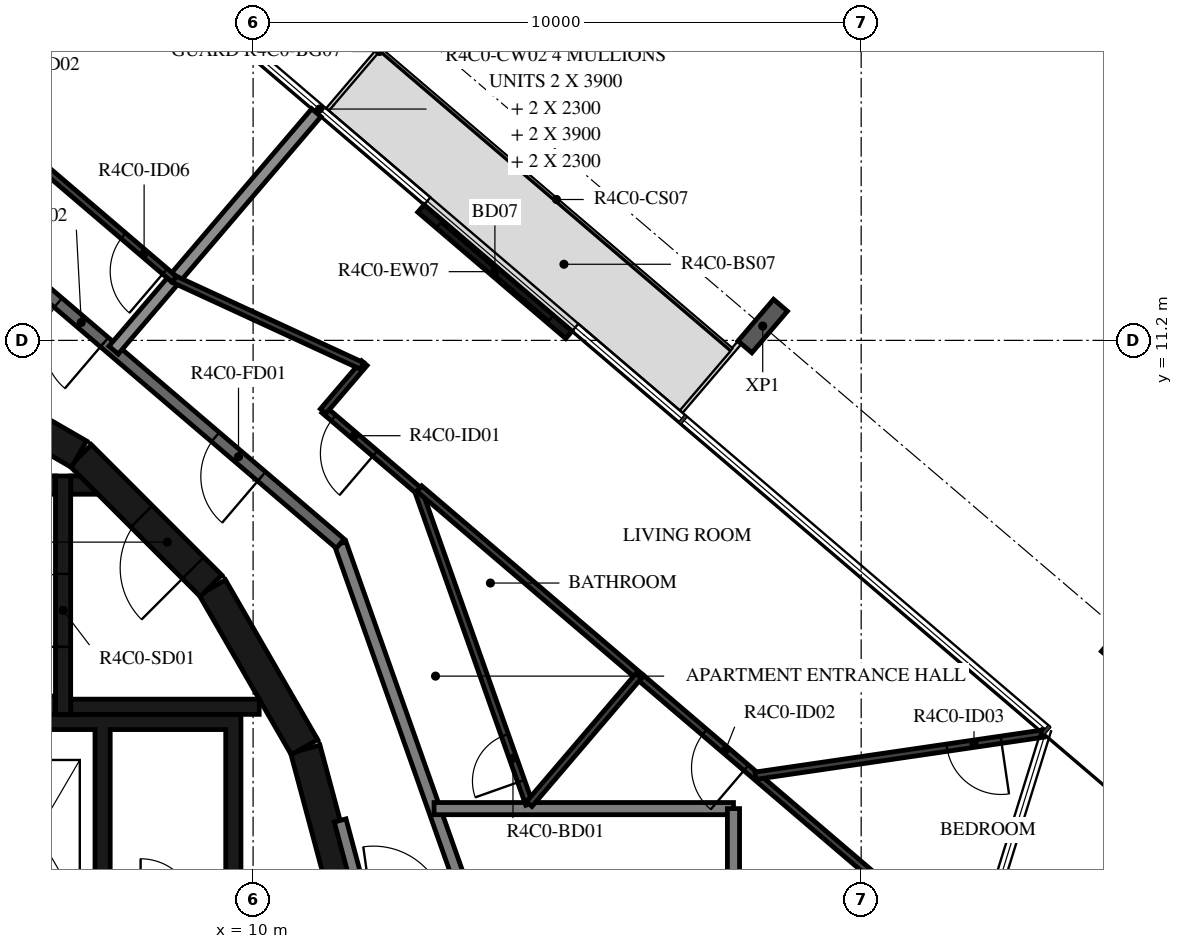
"""IFC4 building model, lengths in metres.
Left out: names, types, materials, properties, quantities, classifications, styles, units other than length and angle.
Written with IfcOpenShell. Run it as: python <this file> out.ifc"""

import sys

from ifc_helpers import new_model, si_unit, direction, frame, frame_2d, origin, origin_2d, place, context, subcontext, project, spatial, polyline, rectangle, i_section, outline, extrude, element, fill, save


model = new_model("IFC4")
c1 = context("Model", 3, precision=1e-05, world=origin(), true_north=direction((0.0, 1.0)))
c2 = subcontext(c1, "Body", "Model", "MODEL_VIEW")
j1 = project(units=[si_unit("LENGTHUNIT", "METRE"), si_unit("PLANEANGLEUNIT", "RADIAN")], contexts=[c1])
p1 = place(None, origin())
s1 = spatial("IfcSite", under=j1, at=p1, CompositionType="ELEMENT")
p2 = place(p1, origin())
s2 = spatial("IfcBuilding", under=s1, at=p2, CompositionType="ELEMENT")
p3 = place(p2, frame((0.0, 0.0, 172.7)))
s3 = spatial("IfcBuildingStorey", under=s2, at=p3, CompositionType="ELEMENT", Elevation=172.7)
for number, where, z_axis, x_axis in (
    (1, (24.358, 6.331, -0.38), (0.0, 0.0, 1.0), (0.76, -0.649, 0.0)),
    (2, (18.381, 11.436, -0.38), (0.0, 0.0, 1.0), (0.76, -0.649, 0.0)),
):
    element("IfcColumn", number, at=place(p3, frame(where, z_axis=z_axis, x_axis=x_axis)), inside=s3, PredefinedType="COLUMN", context=c2, shape_type="SweptSolid", body=[
        extrude(i_section(OverallWidth=0.3, OverallDepth=0.9, WebThickness=0.019, FlangeThickness=0.035, FilletRadius=0.03, at=origin_2d()), origin(), (0.0, 0.0, 1.0), 3.5),
    ])
p4 = place(p3, frame((15.193, 11.291, 0.0), z_axis=(0.0, 0.0, 1.0), x_axis=(-0.760391731187, 0.649464714317, 0.0)))
e3 = element("IfcWall", 3, at=p4, inside=s3, PredefinedType="STANDARD", context=c2, shape_type="SweptSolid", body=[
    extrude(rectangle(XDim=3.2, YDim=0.16, at=frame_2d((1.6, 0.0))), origin(), (0.0, 0.0, 1.0), 3.12),
])
p5 = place(p4, frame((0.4, 0.0, 0.0)))
e4 = element("IfcOpeningElement", 4, at=p5, cuts=e3, PredefinedType="OPENING", context=c2, shape_type="SweptSolid", body=[
    extrude(rectangle(XDim=2.4, YDim=2.4, at=frame_2d((1.2, 1.2))), frame((0.0, 0.09, 0.0), z_axis=(0.0, -1.0, 0.0), x_axis=(1.0, 0.0, 0.0)), (0.0, 0.0, 1.0), 0.18),
])
for number, where, z_axis, x_axis in (
    (5, (11.643, 1.55, 0.0), (0.0, 0.0, 1.0), (-0.259, 0.966, 0.0)),
    (6, (10.845, 4.51, 0.0), (0.0, 0.0, 1.0), (-0.5, 0.866, 0.0)),
):
    element("IfcWall", number, at=place(p3, frame(where, z_axis=z_axis, x_axis=x_axis)), inside=s3, PredefinedType="SHEAR", context=c2, shape_type="SweptSolid", body=[
        extrude(rectangle(XDim=3.033, YDim=0.5, at=frame_2d((1.516, 0.0))), origin(), (0.0, 0.0, 1.0), 3.12),
    ])
p6 = place(p3, frame((9.308, 7.164, 0.0), z_axis=(0.0, 0.0, 1.0), x_axis=(-0.707106781187, 0.707106781187, 0.0)))
e7 = element("IfcWall", 7, at=p6, inside=s3, PredefinedType="SHEAR", context=c2, shape_type="SweptSolid", body=[
    extrude(rectangle(XDim=3.032, YDim=0.5, at=frame_2d((1.516, 0.0))), origin(), (0.0, 0.0, 1.0), 3.12),
])
p7 = place(p6, frame((0.416, 0.0, 0.0)))
e8 = element("IfcOpeningElement", 8, at=p7, cuts=e7, PredefinedType="OPENING", context=c2, shape_type="SweptSolid", body=[
    extrude(rectangle(XDim=1.2, YDim=2.1, at=frame_2d((0.6, 1.05))), frame((0.0, 0.26, 0.0), z_axis=(0.0, -1.0, 0.0), x_axis=(1.0, 0.0, 0.0)), (0.0, 0.0, 1.0), 0.52),
])
p8 = place(p3, frame((7.137, 9.329, 0.0), z_axis=(0.0, 0.0, 1.0), x_axis=(-0.865975092491, 0.500087131594, 0.0)))
e9 = element("IfcWall", 9, at=p8, inside=s3, PredefinedType="SHEAR", context=c2, shape_type="SweptSolid", body=[
    extrude(rectangle(XDim=3.033, YDim=0.5, at=frame_2d((1.516, 0.0))), origin(), (0.0, 0.0, 1.0), 3.12),
])
p9 = place(p8, frame((1.066, 0.0, 0.0)))
e10 = element("IfcOpeningElement", 10, at=p9, cuts=e9, PredefinedType="OPENING", context=c2, shape_type="SweptSolid", body=[
    extrude(rectangle(XDim=0.9, YDim=2.1, at=frame_2d((0.45, 1.05))), frame((0.0, 0.26, 0.0), z_axis=(0.0, -1.0, 0.0), x_axis=(1.0, 0.0, 0.0)), (0.0, 0.0, 1.0), 0.52),
])
for number, where, z_axis, x_axis in (
    (11, (0.0, 5.2, 0.0), (0.0, 0.0, 1.0), (1.0, 0.0, 0.0)),
    (12, (0.0, 8.82, 0.0), (0.0, 0.0, 1.0), (1.0, 0.0, 0.0)),
):
    element("IfcWall", number, at=place(p3, frame(where, z_axis=z_axis, x_axis=x_axis)), inside=s3, PredefinedType="SHEAR", context=c2, shape_type="SweptSolid", body=[
        extrude(rectangle(XDim=6.75, YDim=0.3, at=frame_2d((3.375, 0.0))), origin(), (0.0, 0.0, 1.0), 3.12),
    ])
p10 = place(p3, frame((6.875, 5.05, 0.0), z_axis=(0.0, 0.0, 1.0), x_axis=(0.0, 1.0, 0.0)))
e13 = element("IfcWall", 13, at=p10, inside=s3, PredefinedType="SHEAR", context=c2, shape_type="SweptSolid", body=[
    extrude(rectangle(XDim=3.92, YDim=0.25, at=frame_2d((1.96, 0.0))), origin(), (0.0, 0.0, 1.0), 3.12),
])
p11 = place(p10, frame((1.11, 0.0, 0.0)))
e14 = element("IfcOpeningElement", 14, at=p11, cuts=e13, PredefinedType="OPENING", context=c2, shape_type="SweptSolid", body=[
    extrude(rectangle(XDim=1.2, YDim=2.1, at=frame_2d((0.6, 1.05))), frame((0.0, 0.135, 0.0), z_axis=(0.0, -1.0, 0.0), x_axis=(1.0, 0.0, 0.0)), (0.0, 0.0, 1.0), 0.27),
])
p12 = place(p3, frame((7.0, 5.175, 0.0), z_axis=(0.0, 0.0, 1.0), x_axis=(1.0, 0.0, 0.0)))
e15 = element("IfcWall", 15, at=p12, inside=s3, PredefinedType="SHEAR", context=c2, shape_type="SweptSolid", body=[
    extrude(rectangle(XDim=3.1, YDim=0.25, at=frame_2d((1.55, 0.0))), origin(), (0.0, 0.0, 1.0), 3.12),
])
p13 = place(p3, origin())
e16 = element("IfcWall", 16, at=p13, inside=s3, PredefinedType="SHEAR", context=c2, shape_type="SweptSolid", body=[
    extrude(outline(polyline([(7.448, 8.67), (7.0, 8.67), (7.0, 8.97), (7.148, 8.97), (7.448, 8.67)])), origin(), (0.0, 0.0, 1.0), 3.12),
])
p14 = place(p3, origin())
e17 = element("IfcWall", 17, at=p14, inside=s3, PredefinedType="SHEAR", context=c2, shape_type="SweptSolid", body=[
    extrude(outline(polyline([(-9.55, 4.8), (-1.2, 4.8), (-1.2, 1.9), (-0.95, 1.9), (-0.95, 4.8), (0.95, 4.8), (0.95, 1.9), (1.2, 1.9), (1.2, 4.8), (3.1, 4.8), (3.1, 1.9), (3.35, 1.9), (3.35, 4.8), (5.25, 4.8), (5.25, 1.9), (5.5, 1.9), (5.5, 4.8), (7.4, 4.8), (7.4, 1.9), (7.65, 1.9), (7.65, 4.8), (9.55, 4.8), (9.55, 1.9), (9.8, 1.9), (9.8, 4.8), (9.8, 5.05), (-9.8, 5.05), (-9.8, 4.8), (-9.8, 1.9), (-9.55, 1.9), (-9.55, 4.8)])), origin(), (0.0, 0.0, 1.0), 3.12),
])
p15 = place(p3, frame((11.87, 1.668, 0.0), z_axis=(0.0, 0.0, 1.0), x_axis=(-0.258836880648, 0.965921047093, 0.0)))
e18 = element("IfcWall", 18, at=p15, inside=s3, PredefinedType="STANDARD", context=c2, shape_type="SweptSolid", body=[
    extrude(rectangle(XDim=1.695, YDim=0.2, at=frame_2d((0.848, 0.0))), origin(), (0.0, 0.0, 1.0), 3.12),
])
p16 = place(p3, frame((13.542, 1.903, 0.0), z_axis=(0.0, 0.0, 1.0), x_axis=(-0.333808508206, 0.942640907159, 0.0)))
e19 = element("IfcWall", 19, at=p16, inside=s3, PredefinedType="STANDARD", context=c2, shape_type="SweptSolid", body=[
    extrude(rectangle(XDim=6.317, YDim=0.2, at=frame_2d((3.158, 0.0))), origin(), (0.0, 0.0, 1.0), 3.12),
])
p17 = place(p3, frame((11.433, 7.858, 0.0), z_axis=(0.0, 0.0, 1.0), x_axis=(-0.760412154545, 0.649440801937, 0.0)))
e20 = element("IfcWall", 20, at=p17, inside=s3, PredefinedType="STANDARD", context=c2, shape_type="SweptSolid", body=[
    extrude(rectangle(XDim=7.181, YDim=0.2, at=frame_2d((3.59, 0.0))), origin(), (0.0, 0.0, 1.0), 3.12),
])
p18 = place(p17, frame((1.7, 0.0, 0.0)))
e21 = element("IfcOpeningElement", 21, at=p18, cuts=e20, PredefinedType="OPENING", context=c2, shape_type="SweptSolid", body=[
    extrude(rectangle(XDim=1.0, YDim=2.1, at=frame_2d((0.5, 1.05))), frame((0.0, 0.11, 0.0), z_axis=(0.0, -1.0, 0.0), x_axis=(1.0, 0.0, 0.0)), (0.0, 0.0, 1.0), 0.22),
])
p19 = place(p17, frame((5.101, 0.0, 0.0)))
e22 = element("IfcOpeningElement", 22, at=p19, cuts=e20, PredefinedType="OPENING", context=c2, shape_type="SweptSolid", body=[
    extrude(rectangle(XDim=1.0, YDim=2.1, at=frame_2d((0.5, 1.05))), frame((0.0, 0.11, 0.0), z_axis=(0.0, -1.0, 0.0), x_axis=(1.0, 0.0, 0.0)), (0.0, 0.0, 1.0), 0.22),
])
p20 = place(p3, frame((17.9, 3.5, 0.0), z_axis=(0.0, 0.0, 1.0), x_axis=(-1.0, 0.0, 0.0)))
e23 = element("IfcWall", 23, at=p20, inside=s3, PredefinedType="STANDARD", context=c2, shape_type="SweptSolid", body=[
    extrude(rectangle(XDim=4.924, YDim=0.2, at=frame_2d((2.462, 0.0))), origin(), (0.0, 0.0, 1.0), 3.12),
])
p21 = place(p3, frame((17.9, -3.318, 0.0), z_axis=(0.0, 0.0, 1.0), x_axis=(0.0, 1.0, 0.0)))
e24 = element("IfcWall", 24, at=p21, inside=s3, PredefinedType="STANDARD", context=c2, shape_type="SweptSolid", body=[
    extrude(rectangle(XDim=6.818, YDim=0.2, at=frame_2d((3.409, 0.0))), origin(), (0.0, 0.0, 1.0), 3.12),
])
p22 = place(p3, frame((11.04, 14.943, 0.0), z_axis=(0.0, 0.0, 1.0), x_axis=(-0.649442880087, -0.760410379666, 0.0)))
e25 = element("IfcWall", 25, at=p22, inside=s3, PredefinedType="STANDARD", context=c2, shape_type="SweptSolid", body=[
    extrude(rectangle(XDim=5.133, YDim=0.2, at=frame_2d((2.566, 0.0))), origin(), (0.0, 0.0, 1.0), 2.73),
])
p23 = place(p3, frame((14.541, 3.575, 0.0), z_axis=(0.0, 0.0, 1.0), x_axis=(-0.333799280318, 0.942644174893, 0.0)))
e26 = element("IfcWall", 26, at=p23, inside=s3, PredefinedType="PARTITIONING", context=c2, shape_type="SweptSolid", body=[
    extrude(rectangle(XDim=5.477, YDim=0.12, at=frame_2d((2.738, 0.0))), origin(), (0.0, 0.0, 1.0), 3.12),
])
p24 = place(p23, frame((0.4, 0.0, 0.0)))
e27 = element("IfcOpeningElement", 27, at=p24, cuts=e26, PredefinedType="OPENING", context=c2, shape_type="SweptSolid", body=[
    extrude(rectangle(XDim=0.8, YDim=2.1, at=frame_2d((0.4, 1.05))), frame((0.0, 0.07, 0.0), z_axis=(0.0, -1.0, 0.0), x_axis=(1.0, 0.0, 0.0)), (0.0, 0.0, 1.0), 0.14),
])
p25 = place(p3, frame((12.713, 8.737, 0.0), z_axis=(0.0, 0.0, 1.0), x_axis=(-0.760410825807, 0.649442357716, 0.0)))
e28 = element("IfcWall", 28, at=p25, inside=s3, PredefinedType="PARTITIONING", context=c2, shape_type="SweptSolid", body=[
    extrude(rectangle(XDim=2.029, YDim=0.12, at=frame_2d((1.014, 0.0))), origin(), (0.0, 0.0, 1.0), 3.12),
])
p26 = place(p25, frame((0.929, 0.0, 0.0)))
e29 = element("IfcOpeningElement", 29, at=p26, cuts=e28, PredefinedType="OPENING", context=c2, shape_type="SweptSolid", body=[
    extrude(rectangle(XDim=0.9, YDim=2.1, at=frame_2d((0.45, 1.05))), frame((0.0, 0.07, 0.0), z_axis=(0.0, -1.0, 0.0), x_axis=(1.0, 0.0, 0.0)), (0.0, 0.0, 1.0), 0.14),
])
p27 = place(p3, frame((12.734, 8.762, 0.0), z_axis=(0.0, 0.0, 1.0), x_axis=(0.760390484255, -0.649466174219, 0.0)))
e30 = element("IfcWall", 30, at=p27, inside=s3, PredefinedType="PARTITIONING", context=c2, shape_type="SweptSolid", body=[
    extrude(rectangle(XDim=4.783, YDim=0.12, at=frame_2d((2.391, 0.0))), origin(), (0.0, 0.0, 1.0), 3.12),
])
p28 = place(p3, frame((11.153, 10.034, 0.0), z_axis=(0.0, 0.0, 1.0), x_axis=(0.649381401329, 0.760462882466, 0.0)))
e31 = element("IfcWall", 31, at=p28, inside=s3, PredefinedType="PARTITIONING", context=c2, shape_type="SweptSolid", body=[
    extrude(rectangle(XDim=1.042, YDim=0.12, at=frame_2d((0.521, 0.0))), origin(), (0.0, 0.0, 1.0), 3.12),
])
p29 = place(p3, frame((11.79, 10.781, 0.0), z_axis=(0.0, 0.0, 1.0), x_axis=(-0.907999296286, 0.418971691101, 0.0)))
e32 = element("IfcWall", 32, at=p29, inside=s3, PredefinedType="PARTITIONING", context=c2, shape_type="SweptSolid", body=[
    extrude(rectangle(XDim=3.401, YDim=0.12, at=frame_2d((1.701, 0.0))), origin(), (0.0, 0.0, 1.0), 3.12),
])
p30 = place(p3, frame((23.411, -0.357, 0.0), z_axis=(0.0, 0.0, 1.0), x_axis=(-0.76041871148, 0.649433124525, 0.0)))
e33 = element("IfcWall", 33, at=p30, inside=s3, PredefinedType="PARTITIONING", context=c2, shape_type="SweptSolid", body=[
    extrude(rectangle(XDim=9.259, YDim=0.12, at=frame_2d((4.629, 0.0))), origin(), (0.0, 0.0, 1.0), 3.12),
])
p31 = place(p30, frame((6.972, 0.0, 0.0)))
e34 = element("IfcOpeningElement", 34, at=p31, cuts=e33, PredefinedType="OPENING", context=c2, shape_type="SweptSolid", body=[
    extrude(rectangle(XDim=0.9, YDim=2.1, at=frame_2d((0.45, 1.05))), frame((0.0, 0.07, 0.0), z_axis=(0.0, -1.0, 0.0), x_axis=(1.0, 0.0, 0.0)), (0.0, 0.0, 1.0), 0.14),
])
p32 = place(p30, frame((0.2, 0.0, 0.0)))
e35 = element("IfcOpeningElement", 35, at=p32, cuts=e33, PredefinedType="OPENING", context=c2, shape_type="SweptSolid", body=[
    extrude(rectangle(XDim=0.9, YDim=2.1, at=frame_2d((0.45, 1.05))), frame((0.0, 0.07, 0.0), z_axis=(0.0, -1.0, 0.0), x_axis=(1.0, 0.0, 0.0)), (0.0, 0.0, 1.0), 0.14),
])
p33 = place(p3, frame((16.341, 5.682, 0.0), z_axis=(0.0, 0.0, 1.0), x_axis=(-0.64946993237, -0.76038727432, 0.0)))
e36 = element("IfcWall", 36, at=p33, inside=s3, PredefinedType="PARTITIONING", context=c2, shape_type="SweptSolid", body=[
    extrude(rectangle(XDim=2.771, YDim=0.12, at=frame_2d((1.386, 0.0))), origin(), (0.0, 0.0, 1.0), 3.12),
])
p34 = place(p3, frame((22.994, 4.734, 0.0), z_axis=(0.0, 0.0, 1.0), x_axis=(-0.989449286977, -0.144879634529, 0.0)))
e37 = element("IfcWall", 37, at=p34, inside=s3, PredefinedType="PARTITIONING", context=c2, shape_type="SweptSolid", body=[
    extrude(rectangle(XDim=4.782, YDim=0.12, at=frame_2d((2.391, 0.0))), origin(), (0.0, 0.0, 1.0), 3.12),
])
p35 = place(p34, frame((0.7, 0.0, 0.0)))
e38 = element("IfcOpeningElement", 38, at=p35, cuts=e37, PredefinedType="OPENING", context=c2, shape_type="SweptSolid", body=[
    extrude(rectangle(XDim=0.9, YDim=2.1, at=frame_2d((0.45, 1.05))), frame((0.0, 0.07, 0.0), z_axis=(0.0, -1.0, 0.0), x_axis=(1.0, 0.0, 0.0)), (0.0, 0.0, 1.0), 0.14),
])
p36 = place(p3, frame((8.702, 12.206, 0.0), z_axis=(0.0, 0.0, 1.0), x_axis=(-0.760401313718, 0.649453494945, 0.0)))
e39 = element("IfcWall", 39, at=p36, inside=s3, PredefinedType="PARTITIONING", context=c2, shape_type="SweptSolid", body=[
    extrude(rectangle(XDim=16.724, YDim=0.12, at=frame_2d((8.362, 0.0))), origin(), (0.0, 0.0, 1.0), 3.12),
])
p37 = place(p36, frame((0.2, 0.0, 0.0)))
e40 = element("IfcOpeningElement", 40, at=p37, cuts=e39, PredefinedType="OPENING", context=c2, shape_type="SweptSolid", body=[
    extrude(rectangle(XDim=0.9, YDim=2.1, at=frame_2d((0.45, 1.05))), frame((0.0, 0.07, 0.0), z_axis=(0.0, -1.0, 0.0), x_axis=(1.0, 0.0, 0.0)), (0.0, 0.0, 1.0), 0.14),
])
p38 = place(p36, frame((8.02, 0.0, 0.0)))
e41 = element("IfcOpeningElement", 41, at=p38, cuts=e39, PredefinedType="OPENING", context=c2, shape_type="SweptSolid", body=[
    extrude(rectangle(XDim=0.9, YDim=2.1, at=frame_2d((0.45, 1.05))), frame((0.0, 0.07, 0.0), z_axis=(0.0, -1.0, 0.0), x_axis=(1.0, 0.0, 0.0)), (0.0, 0.0, 1.0), 0.14),
])
p39 = place(p36, frame((14.412, 0.0, 0.0)))
e42 = element("IfcOpeningElement", 42, at=p39, cuts=e39, PredefinedType="OPENING", context=c2, shape_type="SweptSolid", body=[
    extrude(rectangle(XDim=0.9, YDim=2.1, at=frame_2d((0.45, 1.05))), frame((0.0, 0.07, 0.0), z_axis=(0.0, -1.0, 0.0), x_axis=(1.0, 0.0, 0.0)), (0.0, 0.0, 1.0), 0.14),
])
p40 = place(p5, origin())
e43 = element("IfcDoor", 43, at=p40, inside=s3, OperationType="DOUBLE_DOOR_SLIDING", PredefinedType="DOOR", context=c2, shape_type="SweptSolid", body=[
    extrude(rectangle(XDim=2.4, YDim=2.4, at=frame_2d((1.2, 1.2))), frame((0.0, 0.025, 0.0), z_axis=(0.0, -1.0, 0.0), x_axis=(1.0, 0.0, 0.0)), (0.0, 0.0, 1.0), 0.05),
])
fill(e4, e43)
p41 = place(p11, origin())
e44 = element("IfcDoor", 44, at=p41, inside=s3, OperationType="SINGLE_SWING_LEFT", PredefinedType="DOOR", context=c2, shape_type="SweptSolid", body=[
    extrude(rectangle(XDim=1.2, YDim=2.1, at=frame_2d((0.6, 1.05))), frame((0.0, 0.025, 0.0), z_axis=(0.0, -1.0, 0.0), x_axis=(1.0, 0.0, 0.0)), (0.0, 0.0, 1.0), 0.05),
])
fill(e14, e44)
p42 = place(p7, origin())
e45 = element("IfcDoor", 45, at=p42, inside=s3, OperationType="SINGLE_SWING_RIGHT", PredefinedType="DOOR", context=c2, shape_type="SweptSolid", body=[
    extrude(rectangle(XDim=1.2, YDim=2.1, at=frame_2d((0.6, 1.05))), frame((0.0, 0.025, 0.0), z_axis=(0.0, -1.0, 0.0), x_axis=(1.0, 0.0, 0.0)), (0.0, 0.0, 1.0), 0.05),
])
fill(e8, e45)
p43 = place(p18, origin())
e46 = element("IfcDoor", 46, at=p43, inside=s3, OperationType="SINGLE_SWING_LEFT", PredefinedType="DOOR", context=c2, shape_type="SweptSolid", body=[
    extrude(rectangle(XDim=1.0, YDim=2.1, at=frame_2d((0.5, 1.05))), frame((0.0, 0.025, 0.0), z_axis=(0.0, -1.0, 0.0), x_axis=(1.0, 0.0, 0.0)), (0.0, 0.0, 1.0), 0.05),
])
fill(e21, e46)
p44 = place(p24, origin())
e47 = element("IfcDoor", 47, at=p44, inside=s3, OperationType="SINGLE_SWING_LEFT", PredefinedType="DOOR", context=c2, shape_type="SweptSolid", body=[
    extrude(rectangle(XDim=0.8, YDim=2.1, at=frame_2d((0.4, 1.05))), frame((0.0, 0.025, 0.0), z_axis=(0.0, -1.0, 0.0), x_axis=(1.0, 0.0, 0.0)), (0.0, 0.0, 1.0), 0.05),
])
fill(e27, e47)
p45 = place(p26, origin())
e48 = element("IfcDoor", 48, at=p45, inside=s3, OperationType="SINGLE_SWING_LEFT", PredefinedType="DOOR", context=c2, shape_type="SweptSolid", body=[
    extrude(rectangle(XDim=0.9, YDim=2.1, at=frame_2d((0.45, 1.05))), frame((0.0, 0.025, 0.0), z_axis=(0.0, -1.0, 0.0), x_axis=(1.0, 0.0, 0.0)), (0.0, 0.0, 1.0), 0.05),
])
fill(e29, e48)
p46 = place(p31, origin())
e49 = element("IfcDoor", 49, at=p46, inside=s3, OperationType="SINGLE_SWING_RIGHT", PredefinedType="DOOR", context=c2, shape_type="SweptSolid", body=[
    extrude(rectangle(XDim=0.9, YDim=2.1, at=frame_2d((0.45, 1.05))), frame((0.0, 0.025, 0.0), z_axis=(0.0, -1.0, 0.0), x_axis=(1.0, 0.0, 0.0)), (0.0, 0.0, 1.0), 0.05),
])
fill(e34, e49)
p47 = place(p35, origin())
e50 = element("IfcDoor", 50, at=p47, inside=s3, OperationType="SINGLE_SWING_LEFT", PredefinedType="DOOR", context=c2, shape_type="SweptSolid", body=[
    extrude(rectangle(XDim=0.9, YDim=2.1, at=frame_2d((0.45, 1.05))), frame((0.0, 0.025, 0.0), z_axis=(0.0, -1.0, 0.0), x_axis=(1.0, 0.0, 0.0)), (0.0, 0.0, 1.0), 0.05),
])
fill(e38, e50)
p48 = place(p19, origin())
e51 = element("IfcDoor", 51, at=p48, inside=s3, OperationType="SINGLE_SWING_RIGHT", PredefinedType="DOOR", context=c2, shape_type="SweptSolid", body=[
    extrude(rectangle(XDim=1.0, YDim=2.1, at=frame_2d((0.5, 1.05))), frame((0.0, 0.025, 0.0), z_axis=(0.0, -1.0, 0.0), x_axis=(1.0, 0.0, 0.0)), (0.0, 0.0, 1.0), 0.05),
])
fill(e22, e51)
p49 = place(p37, origin())
e52 = element("IfcDoor", 52, at=p49, inside=s3, OperationType="SINGLE_SWING_RIGHT", PredefinedType="DOOR", context=c2, shape_type="SweptSolid", body=[
    extrude(rectangle(XDim=0.9, YDim=2.1, at=frame_2d((0.45, 1.05))), frame((0.0, 0.025, 0.0), z_axis=(0.0, -1.0, 0.0), x_axis=(1.0, 0.0, 0.0)), (0.0, 0.0, 1.0), 0.05),
])
fill(e40, e52)
save(model, sys.argv[1])
